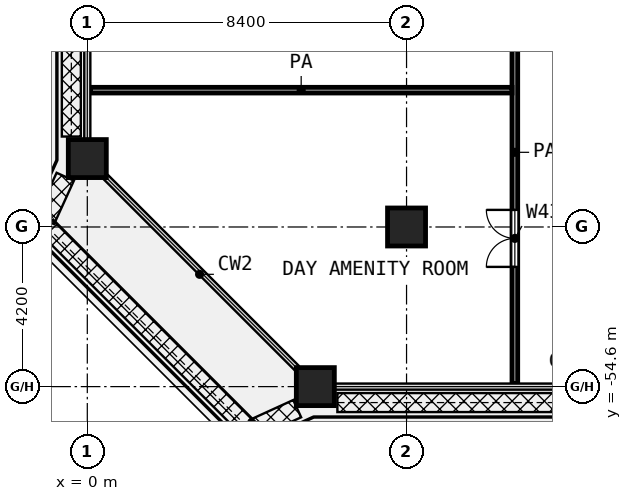
"""IFC4 building model, lengths in metres.
Left out: names, types, materials, properties, quantities, classifications, styles, units other than length and angle.
Written with IfcOpenShell. Run it as: python <this file> out.ifc"""

import sys

from ifc_helpers import new_model, si_unit, direction, frame, frame_2d, origin, origin_2d, place, context, subcontext, project, spatial, rectangle, extrude, element, fill, save


model = new_model("IFC4")
c1 = context("Model", 3, precision=1e-05, world=origin(), true_north=direction((0.0, 1.0)))
c2 = subcontext(c1, "Body", "Model", "MODEL_VIEW")
j1 = project(units=[si_unit("LENGTHUNIT", "METRE"), si_unit("PLANEANGLEUNIT", "RADIAN")], contexts=[c1])
p1 = place(None, origin())
s1 = spatial("IfcSite", under=j1, at=p1, CompositionType="ELEMENT")
p2 = place(p1, origin())
s2 = spatial("IfcBuilding", under=s1, at=p2, CompositionType="ELEMENT")
p3 = place(p2, frame((0.0, 0.0, 187.8)))
s3 = spatial("IfcBuildingStorey", under=s2, at=p3, CompositionType="ELEMENT", Elevation=187.8)
for number, where, z_axis, x_axis in (
    (1, (0.0, -48.6, 0.0), (0.0, 0.0, 1.0), (1.0, 0.0, 0.0)),
    (2, (8.4, -50.4, 0.0), (0.0, 0.0, 1.0), (1.0, 0.0, 0.0)),
    (3, (6.0, -54.6, 0.0), (0.0, 0.0, 1.0), (1.0, 0.0, 0.0)),
):
    element("IfcColumn", number, at=place(p3, frame(where, z_axis=z_axis, x_axis=x_axis)), inside=s3, PredefinedType="COLUMN", context=c2, shape_type="SweptSolid", body=[
        extrude(rectangle(XDim=1.0, YDim=1.0, at=origin_2d()), origin(), (0.0, 0.0, 1.0), 4.2),
    ])
p4 = place(p3, frame((0.08, -46.8, 0.0), z_axis=(0.0, 0.0, 1.0), x_axis=(1.0, 0.0, 0.0)))
e4 = element("IfcWall", 4, at=p4, inside=s3, PredefinedType="PARTITIONING", context=c2, shape_type="SweptSolid", body=[
    extrude(rectangle(XDim=11.095, YDim=0.15, at=frame_2d((5.547, 0.0))), origin(), (0.0, 0.0, 1.0), 3.6),
])
p5 = place(p3, frame((11.25, -54.52, 0.0), z_axis=(0.0, 0.0, 1.0), x_axis=(0.0, 1.0, 0.0)))
e5 = element("IfcWall", 5, at=p5, inside=s3, PredefinedType="PARTITIONING", context=c2, shape_type="SweptSolid", body=[
    extrude(rectangle(XDim=12.17, YDim=0.15, at=frame_2d((6.085, 0.0))), origin(), (0.0, 0.0, 1.0), 3.6),
])
p6 = place(p5, frame((3.07, 0.0, 0.0)))
e6 = element("IfcOpeningElement", 6, at=p6, cuts=e5, PredefinedType="OPENING", context=c2, shape_type="SweptSolid", body=[
    extrude(rectangle(XDim=1.5, YDim=2.1, at=frame_2d((0.75, 1.05))), frame((0.0, 0.085, 0.0), z_axis=(0.0, -1.0, 0.0), x_axis=(1.0, 0.0, 0.0)), (0.0, 0.0, 1.0), 0.17),
])
p7 = place(p6, origin())
e7 = element("IfcDoor", 7, at=p7, inside=s3, OperationType="DOUBLE_DOOR_SINGLE_SWING", PredefinedType="DOOR", context=c2, shape_type="SweptSolid", body=[
    extrude(rectangle(XDim=1.5, YDim=2.1, at=frame_2d((0.75, 1.05))), frame((0.0, 0.025, 0.0), z_axis=(0.0, -1.0, 0.0), x_axis=(1.0, 0.0, 0.0)), (0.0, 0.0, 1.0), 0.05),
])
fill(e6, e7)
save(model, sys.argv[1])
